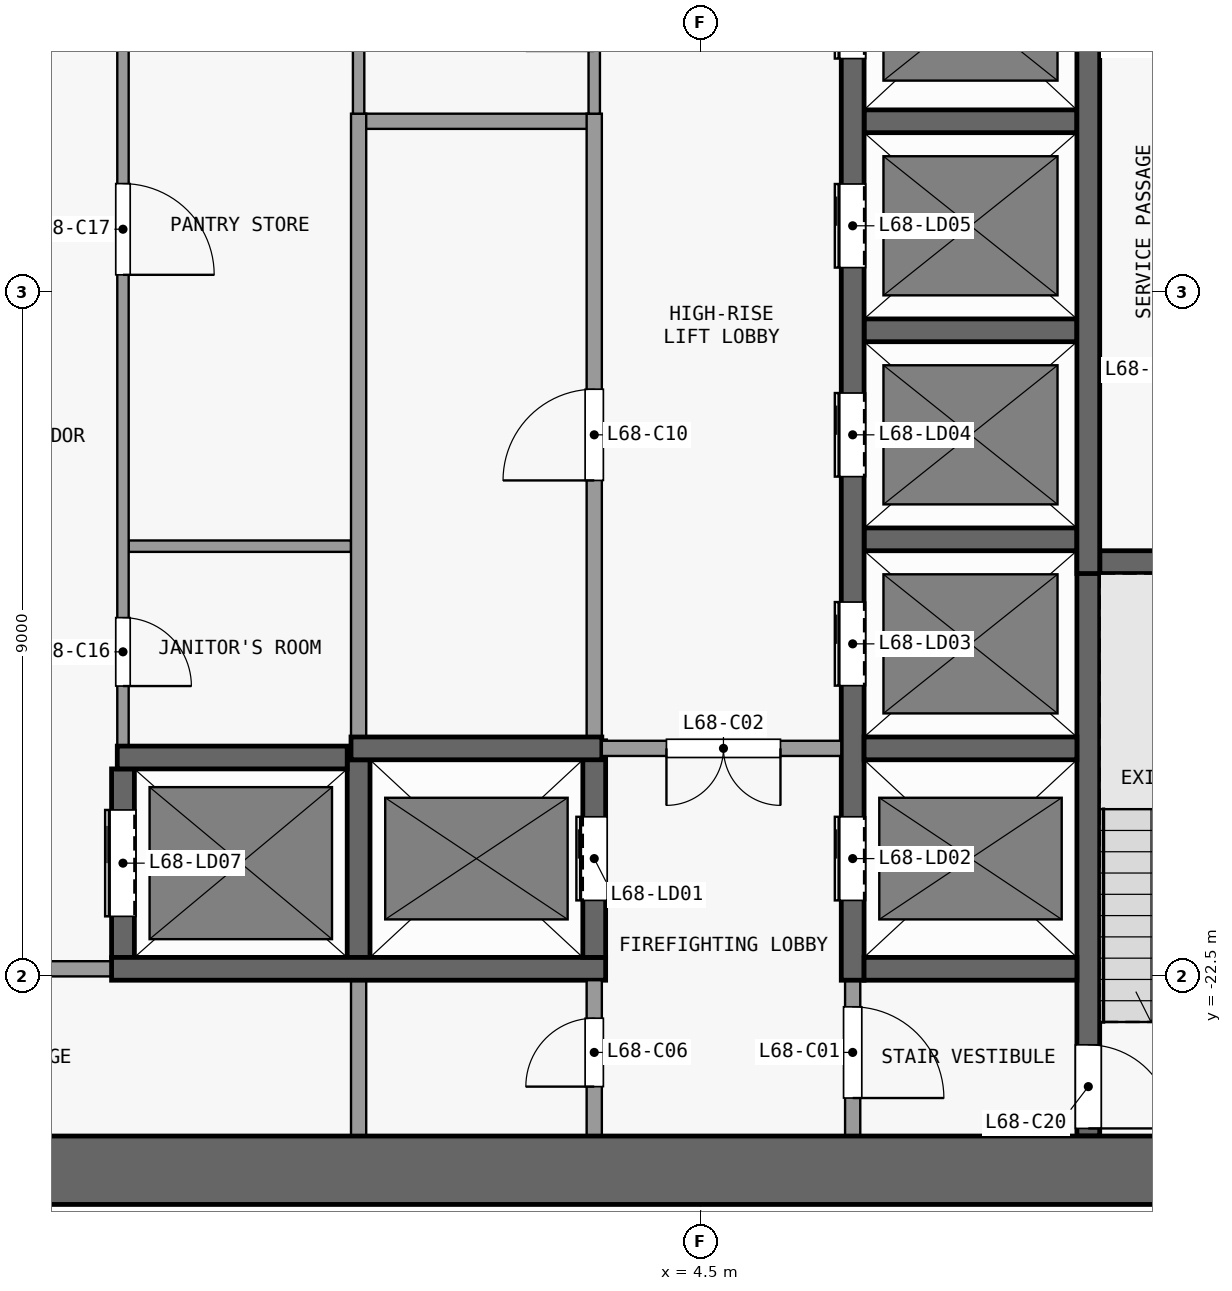
"""IFC4 building model, lengths in metres.
Left out: names, types, materials, properties, quantities, classifications, styles, units other than length and angle.
Written with IfcOpenShell. Run it as: python <this file> out.ifc"""

import sys

from ifc_helpers import new_model, si_unit, direction, frame, frame_2d, origin, place, context, subcontext, project, spatial, rectangle, extrude, element, fill, save


model = new_model("IFC4")
c1 = context("Model", 3, precision=1e-05, world=origin(), true_north=direction((0.0, 1.0)))
c2 = subcontext(c1, "Body", "Model", "MODEL_VIEW")
j1 = project(units=[si_unit("LENGTHUNIT", "METRE"), si_unit("PLANEANGLEUNIT", "RADIAN")], contexts=[c1])
p1 = place(None, origin())
s1 = spatial("IfcSite", under=j1, at=p1, CompositionType="ELEMENT")
p2 = place(p1, origin())
s2 = spatial("IfcBuilding", under=s1, at=p2, CompositionType="ELEMENT")
p3 = place(p2, frame((0.0, 0.0, 269.9)))
s3 = spatial("IfcBuildingStorey", under=s2, at=p3, CompositionType="ELEMENT", Elevation=269.9)
p4 = place(p3, frame((-13.1, -25.05, 0.0), z_axis=(0.0, 0.0, 1.0), x_axis=(1.0, 0.0, 0.0)))
e1 = element("IfcWall", 1, at=p4, inside=s3, PredefinedType="SHEAR", context=c2, shape_type="SweptSolid", body=[
    extrude(rectangle(XDim=26.2, YDim=0.9, at=frame_2d((13.1, 0.0))), origin(), (0.0, 0.0, 1.0), 3.3),
])
p5 = place(p3, frame((-3.25, -22.4, 0.0), z_axis=(0.0, 0.0, 1.0), x_axis=(-1.0, 0.0, 0.0)))
e2 = element("IfcWall", 2, at=p5, inside=s3, PredefinedType="PARTITIONING", context=c2, shape_type="SweptSolid", body=[
    extrude(rectangle(XDim=3.15, YDim=0.2, at=frame_2d((1.575, 0.0))), origin(), (0.0, 0.0, 1.0), 3.3),
])
p6 = place(p5, frame((0.8, 0.0, 0.0)))
e3 = element("IfcOpeningElement", 3, at=p6, cuts=e2, PredefinedType="OPENING", context=c2, shape_type="SweptSolid", body=[
    extrude(rectangle(XDim=1.5, YDim=2.1, at=frame_2d((0.75, 1.05))), frame((0.0, 0.11, 0.0), z_axis=(0.0, -1.0, 0.0), x_axis=(1.0, 0.0, 0.0)), (0.0, 0.0, 1.0), 0.22),
])
p7 = place(p3, frame((-3.25, -22.4, 0.0), z_axis=(0.0, 0.0, 1.0), x_axis=(1.0, 0.0, 0.0)))
e4 = element("IfcWall", 4, at=p7, inside=s3, PredefinedType="SHEAR", context=c2, shape_type="SweptSolid", body=[
    extrude(rectangle(XDim=6.5, YDim=0.3, at=frame_2d((3.25, 0.0))), origin(), (0.0, 0.0, 1.0), 3.3),
])
p8 = place(p3, frame((6.65, -22.4, 0.0), z_axis=(0.0, 0.0, 1.0), x_axis=(1.0, 0.0, 0.0)))
e5 = element("IfcWall", 5, at=p8, inside=s3, PredefinedType="SHEAR", context=c2, shape_type="SweptSolid", body=[
    extrude(rectangle(XDim=2.8, YDim=0.3, at=frame_2d((1.4, 0.0))), origin(), (0.0, 0.0, 1.0), 3.3),
])
p9 = place(p3, frame((-3.175, -19.62, 0.0), z_axis=(0.0, 0.0, 1.0), x_axis=(1.0, 0.0, 0.0)))
e6 = element("IfcWall", 6, at=p9, inside=s3, PredefinedType="SHEAR", context=c2, shape_type="SweptSolid", body=[
    extrude(rectangle(XDim=3.025, YDim=0.3, at=frame_2d((1.513, 0.0))), origin(), (0.0, 0.0, 1.0), 3.3),
])
p10 = place(p3, frame((-0.1, -19.5, 0.0), z_axis=(0.0, 0.0, 1.0), x_axis=(1.0, 0.0, 0.0)))
e7 = element("IfcWall", 7, at=p10, inside=s3, PredefinedType="SHEAR", context=c2, shape_type="SweptSolid", body=[
    extrude(rectangle(XDim=3.3, YDim=0.3, at=frame_2d((1.65, 0.0))), origin(), (0.0, 0.0, 1.0), 3.3),
])
p11 = place(p3, frame((6.35, -19.5, 0.0), z_axis=(0.0, 0.0, 1.0), x_axis=(-1.0, 0.0, 0.0)))
e8 = element("IfcWall", 8, at=p11, inside=s3, PredefinedType="PARTITIONING", context=c2, shape_type="SweptSolid", body=[
    extrude(rectangle(XDim=3.15, YDim=0.2, at=frame_2d((1.575, 0.0))), origin(), (0.0, 0.0, 1.0), 3.3),
])
p12 = place(p11, frame((0.8, 0.0, 0.0)))
e9 = element("IfcOpeningElement", 9, at=p12, cuts=e8, PredefinedType="OPENING", context=c2, shape_type="SweptSolid", body=[
    extrude(rectangle(XDim=1.5, YDim=2.1, at=frame_2d((0.75, 1.05))), frame((0.0, 0.11, 0.0), z_axis=(0.0, -1.0, 0.0), x_axis=(1.0, 0.0, 0.0)), (0.0, 0.0, 1.0), 0.22),
])
p13 = place(p3, frame((6.65, -19.5, 0.0), z_axis=(0.0, 0.0, 1.0), x_axis=(1.0, 0.0, 0.0)))
e10 = element("IfcWall", 10, at=p13, inside=s3, PredefinedType="SHEAR", context=c2, shape_type="SweptSolid", body=[
    extrude(rectangle(XDim=2.8, YDim=0.3, at=frame_2d((1.4, 0.0))), origin(), (0.0, 0.0, 1.0), 3.3),
])
p14 = place(p3, frame((9.75, -17.05, 0.0), z_axis=(0.0, 0.0, 1.0), x_axis=(1.0, 0.0, 0.0)))
e11 = element("IfcWall", 11, at=p14, inside=s3, PredefinedType="SHEAR", context=c2, shape_type="SweptSolid", body=[
    extrude(rectangle(XDim=2.85, YDim=0.3, at=frame_2d((1.425, 0.0))), origin(), (0.0, 0.0, 1.0), 3.3),
])
p15 = place(p3, frame((-3.025, -16.84, 0.0), z_axis=(0.0, 0.0, 1.0), x_axis=(1.0, 0.0, 0.0)))
e12 = element("IfcWall", 12, at=p15, inside=s3, PredefinedType="PARTITIONING", context=c2, shape_type="SweptSolid", body=[
    extrude(rectangle(XDim=2.925, YDim=0.15, at=frame_2d((1.462, 0.0))), origin(), (0.0, 0.0, 1.0), 3.3),
])
for number, where, z_axis, x_axis in (
    (13, (6.65, -16.75, 0.0), (0.0, 0.0, 1.0), (1.0, 0.0, 0.0)),
    (14, (6.65, -14.0, 0.0), (0.0, 0.0, 1.0), (1.0, 0.0, 0.0)),
):
    element("IfcWall", number, at=place(p3, frame(where, z_axis=z_axis, x_axis=x_axis)), inside=s3, PredefinedType="SHEAR", context=c2, shape_type="SweptSolid", body=[
        extrude(rectangle(XDim=2.8, YDim=0.3, at=frame_2d((1.4, 0.0))), origin(), (0.0, 0.0, 1.0), 3.3),
    ])
p16 = place(p3, frame((-0.075, -11.25, 0.0), z_axis=(0.0, 0.0, 1.0), x_axis=(1.0, 0.0, 0.0)))
e15 = element("IfcWall", 15, at=p16, inside=s3, PredefinedType="PARTITIONING", context=c2, shape_type="SweptSolid", body=[
    extrude(rectangle(XDim=3.25, YDim=0.2, at=frame_2d((1.625, 0.0))), origin(), (0.0, 0.0, 1.0), 3.3),
])
p17 = place(p3, frame((6.65, -11.25, 0.0), z_axis=(0.0, 0.0, 1.0), x_axis=(1.0, 0.0, 0.0)))
e16 = element("IfcWall", 16, at=p17, inside=s3, PredefinedType="SHEAR", context=c2, shape_type="SweptSolid", body=[
    extrude(rectangle(XDim=2.8, YDim=0.3, at=frame_2d((1.4, 0.0))), origin(), (0.0, 0.0, 1.0), 3.3),
])
p18 = place(p3, frame((-3.1, -22.25, 0.0), z_axis=(0.0, 0.0, 1.0), x_axis=(0.0, 1.0, 0.0)))
e17 = element("IfcWall", 17, at=p18, inside=s3, PredefinedType="SHEAR", context=c2, shape_type="SweptSolid", body=[
    extrude(rectangle(XDim=2.48, YDim=0.3, at=frame_2d((1.24, 0.0))), origin(), (0.0, 0.0, 1.0), 3.3),
])
p19 = place(p18, frame((0.54, 0.0, 0.0)))
e18 = element("IfcOpeningElement", 18, at=p19, cuts=e17, PredefinedType="OPENING", context=c2, shape_type="SweptSolid", body=[
    extrude(rectangle(XDim=1.4, YDim=2.1, at=frame_2d((0.7, 1.05))), frame((0.0, 0.16, 0.0), z_axis=(0.0, -1.0, 0.0), x_axis=(1.0, 0.0, 0.0)), (0.0, 0.0, 1.0), 0.32),
])
p20 = place(p3, frame((-3.1, -8.5, 0.0), z_axis=(0.0, 0.0, 1.0), x_axis=(0.0, -1.0, 0.0)))
e19 = element("IfcWall", 19, at=p20, inside=s3, PredefinedType="PARTITIONING", context=c2, shape_type="SweptSolid", body=[
    extrude(rectangle(XDim=10.97, YDim=0.15, at=frame_2d((5.485, 0.0))), origin(), (0.0, 0.0, 1.0), 3.3),
])
p21 = place(p20, frame((9.28, 0.0, 0.0)))
e20 = element("IfcOpeningElement", 20, at=p21, cuts=e19, PredefinedType="OPENING", context=c2, shape_type="SweptSolid", body=[
    extrude(rectangle(XDim=0.9, YDim=2.1, at=frame_2d((0.45, 1.05))), frame((0.0, 0.085, 0.0), z_axis=(0.0, -1.0, 0.0), x_axis=(1.0, 0.0, 0.0)), (0.0, 0.0, 1.0), 0.17),
])
p22 = place(p20, frame((3.57, 0.0, 0.0)))
e21 = element("IfcOpeningElement", 21, at=p22, cuts=e19, PredefinedType="OPENING", context=c2, shape_type="SweptSolid", body=[
    extrude(rectangle(XDim=1.2, YDim=2.1, at=frame_2d((0.6, 1.05))), frame((0.0, 0.085, 0.0), z_axis=(0.0, -1.0, 0.0), x_axis=(1.0, 0.0, 0.0)), (0.0, 0.0, 1.0), 0.17),
])
p23 = place(p3, frame((0.0, -24.6, 0.0), z_axis=(0.0, 0.0, 1.0), x_axis=(0.0, 1.0, 0.0)))
e22 = element("IfcWall", 22, at=p23, inside=s3, PredefinedType="PARTITIONING", context=c2, shape_type="SweptSolid", body=[
    extrude(rectangle(XDim=2.05, YDim=0.2, at=frame_2d((1.025, 0.0))), origin(), (0.0, 0.0, 1.0), 3.3),
])
p24 = place(p3, frame((0.0, -22.25, 0.0), z_axis=(0.0, 0.0, 1.0), x_axis=(0.0, 1.0, 0.0)))
e23 = element("IfcWall", 23, at=p24, inside=s3, PredefinedType="SHEAR", context=c2, shape_type="SweptSolid", body=[
    extrude(rectangle(XDim=2.6, YDim=0.3, at=frame_2d((1.3, 0.0))), origin(), (0.0, 0.0, 1.0), 3.3),
])
p25 = place(p3, frame((0.0, -19.35, 0.0), z_axis=(0.0, 0.0, 1.0), x_axis=(0.0, 1.0, 0.0)))
e24 = element("IfcWall", 24, at=p25, inside=s3, PredefinedType="PARTITIONING", context=c2, shape_type="SweptSolid", body=[
    extrude(rectangle(XDim=8.2, YDim=0.2, at=frame_2d((4.1, 0.0))), origin(), (0.0, 0.0, 1.0), 3.3),
])
p26 = place(p3, frame((0.0, -11.15, 0.0), z_axis=(0.0, 0.0, 1.0), x_axis=(0.0, 1.0, 0.0)))
e25 = element("IfcWall", 25, at=p26, inside=s3, PredefinedType="PARTITIONING", context=c2, shape_type="SweptSolid", body=[
    extrude(rectangle(XDim=2.65, YDim=0.15, at=frame_2d((1.325, 0.0))), origin(), (0.0, 0.0, 1.0), 3.3),
])
p27 = place(p3, frame((3.1, -24.6, 0.0), z_axis=(0.0, 0.0, 1.0), x_axis=(0.0, 1.0, 0.0)))
e26 = element("IfcWall", 26, at=p27, inside=s3, PredefinedType="PARTITIONING", context=c2, shape_type="SweptSolid", body=[
    extrude(rectangle(XDim=2.05, YDim=0.2, at=frame_2d((1.025, 0.0))), origin(), (0.0, 0.0, 1.0), 3.3),
])
p28 = place(p27, frame((0.65, 0.0, 0.0)))
e27 = element("IfcOpeningElement", 27, at=p28, cuts=e26, PredefinedType="OPENING", context=c2, shape_type="SweptSolid", body=[
    extrude(rectangle(XDim=0.9, YDim=2.1, at=frame_2d((0.45, 1.05))), frame((0.0, 0.11, 0.0), z_axis=(0.0, -1.0, 0.0), x_axis=(1.0, 0.0, 0.0)), (0.0, 0.0, 1.0), 0.22),
])
p29 = place(p3, frame((3.1, -22.25, 0.0), z_axis=(0.0, 0.0, 1.0), x_axis=(0.0, 1.0, 0.0)))
e28 = element("IfcWall", 28, at=p29, inside=s3, PredefinedType="SHEAR", context=c2, shape_type="SweptSolid", body=[
    extrude(rectangle(XDim=2.85, YDim=0.3, at=frame_2d((1.425, 0.0))), origin(), (0.0, 0.0, 1.0), 3.3),
])
p30 = place(p29, frame((0.75, 0.0, 0.0)))
e29 = element("IfcOpeningElement", 29, at=p30, cuts=e28, PredefinedType="OPENING", context=c2, shape_type="SweptSolid", body=[
    extrude(rectangle(XDim=1.1, YDim=2.1, at=frame_2d((0.55, 1.05))), frame((0.0, 0.16, 0.0), z_axis=(0.0, -1.0, 0.0), x_axis=(1.0, 0.0, 0.0)), (0.0, 0.0, 1.0), 0.32),
])
p31 = place(p3, frame((3.1, -19.6, 0.0), z_axis=(0.0, 0.0, 1.0), x_axis=(0.0, 1.0, 0.0)))
e30 = element("IfcWall", 30, at=p31, inside=s3, PredefinedType="PARTITIONING", context=c2, shape_type="SweptSolid", body=[
    extrude(rectangle(XDim=8.45, YDim=0.2, at=frame_2d((4.225, 0.0))), origin(), (0.0, 0.0, 1.0), 3.3),
])
p32 = place(p31, frame((3.625, 0.0, 0.0)))
e31 = element("IfcOpeningElement", 31, at=p32, cuts=e30, PredefinedType="OPENING", context=c2, shape_type="SweptSolid", body=[
    extrude(rectangle(XDim=1.2, YDim=2.1, at=frame_2d((0.6, 1.05))), frame((0.0, 0.11, 0.0), z_axis=(0.0, -1.0, 0.0), x_axis=(1.0, 0.0, 0.0)), (0.0, 0.0, 1.0), 0.22),
])
p33 = place(p3, frame((3.1, -11.15, 0.0), z_axis=(0.0, 0.0, 1.0), x_axis=(0.0, 1.0, 0.0)))
e32 = element("IfcWall", 32, at=p33, inside=s3, PredefinedType="PARTITIONING", context=c2, shape_type="SweptSolid", body=[
    extrude(rectangle(XDim=2.65, YDim=0.15, at=frame_2d((1.325, 0.0))), origin(), (0.0, 0.0, 1.0), 3.3),
])
p34 = place(p33, frame((0.825, 0.0, 0.0)))
e33 = element("IfcOpeningElement", 33, at=p34, cuts=e32, PredefinedType="OPENING", context=c2, shape_type="SweptSolid", body=[
    extrude(rectangle(XDim=0.9, YDim=2.1, at=frame_2d((0.45, 1.05))), frame((0.0, 0.085, 0.0), z_axis=(0.0, -1.0, 0.0), x_axis=(1.0, 0.0, 0.0)), (0.0, 0.0, 1.0), 0.17),
])
p35 = place(p3, frame((6.5, -22.55, 0.0), z_axis=(0.0, 0.0, 1.0), x_axis=(0.0, -1.0, 0.0)))
e34 = element("IfcWall", 34, at=p35, inside=s3, PredefinedType="PARTITIONING", context=c2, shape_type="SweptSolid", body=[
    extrude(rectangle(XDim=2.05, YDim=0.2, at=frame_2d((1.025, 0.0))), origin(), (0.0, 0.0, 1.0), 3.3),
])
p36 = place(p35, frame((0.35, 0.0, 0.0)))
e35 = element("IfcOpeningElement", 35, at=p36, cuts=e34, PredefinedType="OPENING", context=c2, shape_type="SweptSolid", body=[
    extrude(rectangle(XDim=1.2, YDim=2.1, at=frame_2d((0.6, 1.05))), frame((0.0, 0.11, 0.0), z_axis=(0.0, -1.0, 0.0), x_axis=(1.0, 0.0, 0.0)), (0.0, 0.0, 1.0), 0.22),
])
p37 = place(p3, frame((6.5, -22.55, 0.0), z_axis=(0.0, 0.0, 1.0), x_axis=(0.0, 1.0, 0.0)))
e36 = element("IfcWall", 36, at=p37, inside=s3, PredefinedType="SHEAR", context=c2, shape_type="SweptSolid", body=[
    extrude(rectangle(XDim=14.05, YDim=0.3, at=frame_2d((7.025, 0.0))), origin(), (0.0, 0.0, 1.0), 3.3),
])
p38 = place(p37, frame((1.05, 0.0, 0.0)))
e37 = element("IfcOpeningElement", 37, at=p38, cuts=e36, PredefinedType="OPENING", context=c2, shape_type="SweptSolid", body=[
    extrude(rectangle(XDim=1.1, YDim=2.1, at=frame_2d((0.55, 1.05))), frame((0.0, 0.16, 0.0), z_axis=(0.0, -1.0, 0.0), x_axis=(1.0, 0.0, 0.0)), (0.0, 0.0, 1.0), 0.32),
])
p39 = place(p37, frame((3.875, 0.0, 0.0)))
e38 = element("IfcOpeningElement", 38, at=p39, cuts=e36, PredefinedType="OPENING", context=c2, shape_type="SweptSolid", body=[
    extrude(rectangle(XDim=1.1, YDim=2.1, at=frame_2d((0.55, 1.05))), frame((0.0, 0.16, 0.0), z_axis=(0.0, -1.0, 0.0), x_axis=(1.0, 0.0, 0.0)), (0.0, 0.0, 1.0), 0.32),
])
p40 = place(p37, frame((6.625, 0.0, 0.0)))
e39 = element("IfcOpeningElement", 39, at=p40, cuts=e36, PredefinedType="OPENING", context=c2, shape_type="SweptSolid", body=[
    extrude(rectangle(XDim=1.1, YDim=2.1, at=frame_2d((0.55, 1.05))), frame((0.0, 0.16, 0.0), z_axis=(0.0, -1.0, 0.0), x_axis=(1.0, 0.0, 0.0)), (0.0, 0.0, 1.0), 0.32),
])
p41 = place(p37, frame((9.375, 0.0, 0.0)))
e40 = element("IfcOpeningElement", 40, at=p41, cuts=e36, PredefinedType="OPENING", context=c2, shape_type="SweptSolid", body=[
    extrude(rectangle(XDim=1.1, YDim=2.1, at=frame_2d((0.55, 1.05))), frame((0.0, 0.16, 0.0), z_axis=(0.0, -1.0, 0.0), x_axis=(1.0, 0.0, 0.0)), (0.0, 0.0, 1.0), 0.32),
])
p42 = place(p37, frame((12.125, 0.0, 0.0)))
e41 = element("IfcOpeningElement", 41, at=p42, cuts=e36, PredefinedType="OPENING", context=c2, shape_type="SweptSolid", body=[
    extrude(rectangle(XDim=1.1, YDim=2.1, at=frame_2d((0.55, 1.05))), frame((0.0, 0.16, 0.0), z_axis=(0.0, -1.0, 0.0), x_axis=(1.0, 0.0, 0.0)), (0.0, 0.0, 1.0), 0.32),
])
p43 = place(p3, frame((9.6, -16.9, 0.0), z_axis=(0.0, 0.0, 1.0), x_axis=(0.0, -1.0, 0.0)))
e42 = element("IfcWall", 42, at=p43, inside=s3, PredefinedType="SHEAR", context=c2, shape_type="SweptSolid", body=[
    extrude(rectangle(XDim=7.7, YDim=0.3, at=frame_2d((3.85, 0.0))), origin(), (0.0, 0.0, 1.0), 3.3),
])
p44 = place(p43, frame((6.5, 0.0, 0.0)))
e43 = element("IfcOpeningElement", 43, at=p44, cuts=e42, PredefinedType="OPENING", context=c2, shape_type="SweptSolid", body=[
    extrude(rectangle(XDim=1.1, YDim=2.1, at=frame_2d((0.55, 1.05))), frame((0.0, 0.16, 0.0), z_axis=(0.0, -1.0, 0.0), x_axis=(1.0, 0.0, 0.0)), (0.0, 0.0, 1.0), 0.32),
])
p45 = place(p3, frame((9.6, -17.2, 0.0), z_axis=(0.0, 0.0, 1.0), x_axis=(0.0, 1.0, 0.0)))
e44 = element("IfcWall", 44, at=p45, inside=s3, PredefinedType="SHEAR", context=c2, shape_type="SweptSolid", body=[
    extrude(rectangle(XDim=8.7, YDim=0.3, at=frame_2d((4.35, 0.0))), origin(), (0.0, 0.0, 1.0), 3.3),
])
p46 = place(p30, origin())
e45 = element("IfcDoor", 45, at=p46, inside=s3, OperationType="DOUBLE_DOOR_SLIDING", PredefinedType="DOOR", context=c2, shape_type="SweptSolid", body=[
    extrude(rectangle(XDim=1.1, YDim=2.1, at=frame_2d((0.55, 1.05))), frame((0.0, 0.025, 0.0), z_axis=(0.0, -1.0, 0.0), x_axis=(1.0, 0.0, 0.0)), (0.0, 0.0, 1.0), 0.05),
])
fill(e29, e45)
p47 = place(p38, origin())
e46 = element("IfcDoor", 46, at=p47, inside=s3, OperationType="DOUBLE_DOOR_SLIDING", PredefinedType="DOOR", context=c2, shape_type="SweptSolid", body=[
    extrude(rectangle(XDim=1.1, YDim=2.1, at=frame_2d((0.55, 1.05))), frame((0.0, 0.025, 0.0), z_axis=(0.0, -1.0, 0.0), x_axis=(1.0, 0.0, 0.0)), (0.0, 0.0, 1.0), 0.05),
])
fill(e37, e46)
p48 = place(p39, origin())
e47 = element("IfcDoor", 47, at=p48, inside=s3, OperationType="DOUBLE_DOOR_SLIDING", PredefinedType="DOOR", context=c2, shape_type="SweptSolid", body=[
    extrude(rectangle(XDim=1.1, YDim=2.1, at=frame_2d((0.55, 1.05))), frame((0.0, 0.025, 0.0), z_axis=(0.0, -1.0, 0.0), x_axis=(1.0, 0.0, 0.0)), (0.0, 0.0, 1.0), 0.05),
])
fill(e38, e47)
p49 = place(p40, origin())
e48 = element("IfcDoor", 48, at=p49, inside=s3, OperationType="DOUBLE_DOOR_SLIDING", PredefinedType="DOOR", context=c2, shape_type="SweptSolid", body=[
    extrude(rectangle(XDim=1.1, YDim=2.1, at=frame_2d((0.55, 1.05))), frame((0.0, 0.025, 0.0), z_axis=(0.0, -1.0, 0.0), x_axis=(1.0, 0.0, 0.0)), (0.0, 0.0, 1.0), 0.05),
])
fill(e39, e48)
p50 = place(p41, origin())
e49 = element("IfcDoor", 49, at=p50, inside=s3, OperationType="DOUBLE_DOOR_SLIDING", PredefinedType="DOOR", context=c2, shape_type="SweptSolid", body=[
    extrude(rectangle(XDim=1.1, YDim=2.1, at=frame_2d((0.55, 1.05))), frame((0.0, 0.025, 0.0), z_axis=(0.0, -1.0, 0.0), x_axis=(1.0, 0.0, 0.0)), (0.0, 0.0, 1.0), 0.05),
])
fill(e40, e49)
p51 = place(p42, origin())
e50 = element("IfcDoor", 50, at=p51, inside=s3, OperationType="DOUBLE_DOOR_SLIDING", PredefinedType="DOOR", context=c2, shape_type="SweptSolid", body=[
    extrude(rectangle(XDim=1.1, YDim=2.1, at=frame_2d((0.55, 1.05))), frame((0.0, 0.025, 0.0), z_axis=(0.0, -1.0, 0.0), x_axis=(1.0, 0.0, 0.0)), (0.0, 0.0, 1.0), 0.05),
])
fill(e41, e50)
p52 = place(p19, origin())
e51 = element("IfcDoor", 51, at=p52, inside=s3, OperationType="DOUBLE_DOOR_SLIDING", PredefinedType="DOOR", context=c2, shape_type="SweptSolid", body=[
    extrude(rectangle(XDim=1.4, YDim=2.1, at=frame_2d((0.7, 1.05))), frame((0.0, 0.025, 0.0), z_axis=(0.0, -1.0, 0.0), x_axis=(1.0, 0.0, 0.0)), (0.0, 0.0, 1.0), 0.05),
])
fill(e18, e51)
p53 = place(p36, origin())
e52 = element("IfcDoor", 52, at=p53, inside=s3, OperationType="SINGLE_SWING_RIGHT", PredefinedType="DOOR", context=c2, shape_type="SweptSolid", body=[
    extrude(rectangle(XDim=1.2, YDim=2.1, at=frame_2d((0.6, 1.05))), frame((0.0, 0.025, 0.0), z_axis=(0.0, -1.0, 0.0), x_axis=(1.0, 0.0, 0.0)), (0.0, 0.0, 1.0), 0.05),
])
fill(e35, e52)
p54 = place(p12, origin())
e53 = element("IfcDoor", 53, at=p54, inside=s3, OperationType="DOUBLE_DOOR_SINGLE_SWING", PredefinedType="DOOR", context=c2, shape_type="SweptSolid", body=[
    extrude(rectangle(XDim=1.5, YDim=2.1, at=frame_2d((0.75, 1.05))), frame((0.0, 0.025, 0.0), z_axis=(0.0, -1.0, 0.0), x_axis=(1.0, 0.0, 0.0)), (0.0, 0.0, 1.0), 0.05),
])
fill(e9, e53)
p55 = place(p28, origin())
e54 = element("IfcDoor", 54, at=p55, inside=s3, OperationType="SINGLE_SWING_LEFT", PredefinedType="DOOR", context=c2, shape_type="SweptSolid", body=[
    extrude(rectangle(XDim=0.9, YDim=2.1, at=frame_2d((0.45, 1.05))), frame((0.0, 0.025, 0.0), z_axis=(0.0, -1.0, 0.0), x_axis=(1.0, 0.0, 0.0)), (0.0, 0.0, 1.0), 0.05),
])
fill(e27, e54)
p56 = place(p32, origin())
e55 = element("IfcDoor", 55, at=p56, inside=s3, OperationType="SINGLE_SWING_LEFT", PredefinedType="DOOR", context=c2, shape_type="SweptSolid", body=[
    extrude(rectangle(XDim=1.2, YDim=2.1, at=frame_2d((0.6, 1.05))), frame((0.0, 0.025, 0.0), z_axis=(0.0, -1.0, 0.0), x_axis=(1.0, 0.0, 0.0)), (0.0, 0.0, 1.0), 0.05),
])
fill(e31, e55)
p57 = place(p21, origin())
e56 = element("IfcDoor", 56, at=p57, inside=s3, OperationType="SINGLE_SWING_RIGHT", PredefinedType="DOOR", context=c2, shape_type="SweptSolid", body=[
    extrude(rectangle(XDim=0.9, YDim=2.1, at=frame_2d((0.45, 1.05))), frame((0.0, 0.025, 0.0), z_axis=(0.0, -1.0, 0.0), x_axis=(1.0, 0.0, 0.0)), (0.0, 0.0, 1.0), 0.05),
])
fill(e20, e56)
p58 = place(p22, origin())
e57 = element("IfcDoor", 57, at=p58, inside=s3, OperationType="SINGLE_SWING_RIGHT", PredefinedType="DOOR", context=c2, shape_type="SweptSolid", body=[
    extrude(rectangle(XDim=1.2, YDim=2.1, at=frame_2d((0.6, 1.05))), frame((0.0, 0.025, 0.0), z_axis=(0.0, -1.0, 0.0), x_axis=(1.0, 0.0, 0.0)), (0.0, 0.0, 1.0), 0.05),
])
fill(e21, e57)
p59 = place(p44, origin())
e58 = element("IfcDoor", 58, at=p59, inside=s3, OperationType="SINGLE_SWING_RIGHT", PredefinedType="DOOR", context=c2, shape_type="SweptSolid", body=[
    extrude(rectangle(XDim=1.1, YDim=2.1, at=frame_2d((0.55, 1.05))), frame((0.0, 0.025, 0.0), z_axis=(0.0, -1.0, 0.0), x_axis=(1.0, 0.0, 0.0)), (0.0, 0.0, 1.0), 0.05),
])
fill(e43, e58)
save(model, sys.argv[1])
